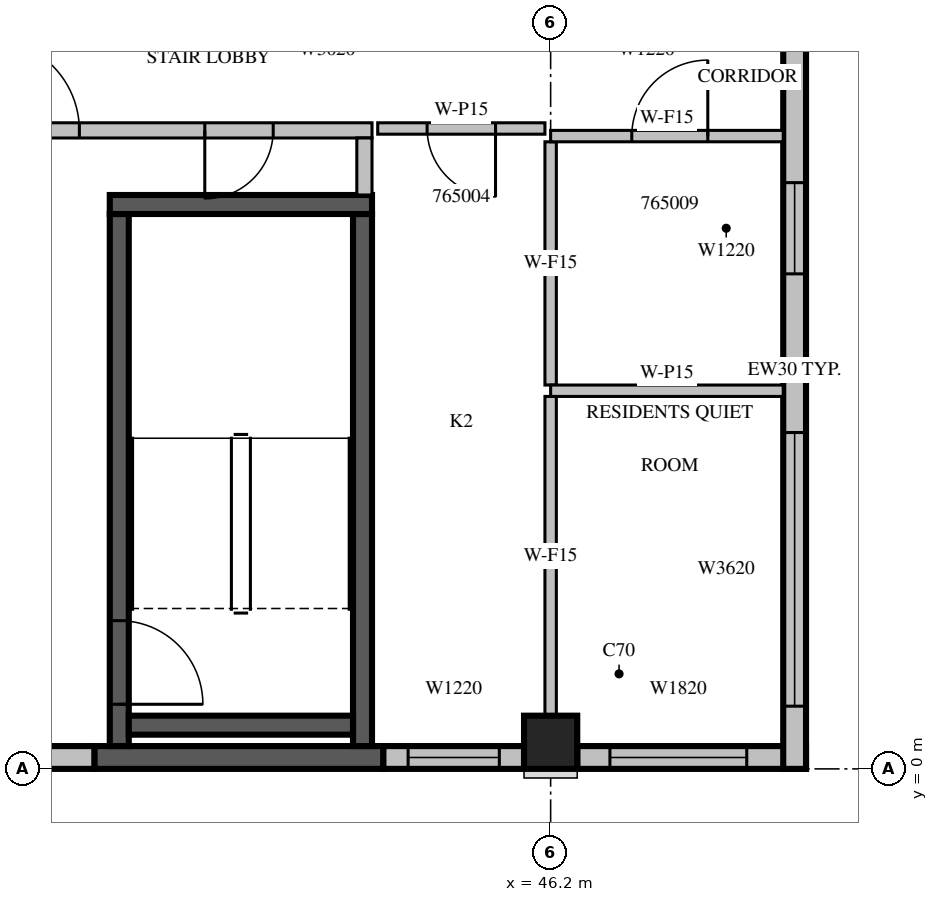
"""IFC4 building model, lengths in metres.
Left out: names, types, materials, properties, quantities, classifications, styles, units other than length and angle.
Written with IfcOpenShell. Run it as: python <this file> out.ifc"""

import sys

from ifc_helpers import new_model, si_unit, direction, frame, frame_2d, origin, origin_2d, place, context, subcontext, project, spatial, rectangle, extrude, source, transform, mapped, element, fill, save


model = new_model("IFC4")
c1 = context("Model", 3, precision=1e-05, world=origin(), true_north=direction((0.0, 1.0)))
c2 = subcontext(c1, "Body", "Model", "MODEL_VIEW")
j1 = project(units=[si_unit("LENGTHUNIT", "METRE"), si_unit("PLANEANGLEUNIT", "RADIAN")], contexts=[c1])
p1 = place(None, origin())
s1 = spatial("IfcSite", under=j1, at=p1, CompositionType="ELEMENT")
p2 = place(p1, origin())
s2 = spatial("IfcBuilding", under=s1, at=p2, CompositionType="ELEMENT")
p3 = place(p2, frame((0.0, 0.0, 288.0)))
s3 = spatial("IfcBuildingStorey", under=s2, at=p3, CompositionType="ELEMENT", Elevation=288.0)
m1 = source(origin(), c2, "Body", "SweptSolid", [
    extrude(rectangle(XDim=0.7, YDim=0.7, at=origin_2d()), origin(), (0.0, 0.0, 1.0), 3.5),
])
p4 = place(p3, frame((46.2, 0.35, 0.0), z_axis=(0.0, 0.0, 1.0), x_axis=(1.0, 0.0, 0.0)))
e1 = element("IfcColumn", 1, at=p4, inside=s3, PredefinedType="COLUMN", context=c2, shape_type="MappedRepresentation", body=[
    mapped(m1, transform((0.0, 0.0, 0.0), scale=1.0)),
])
m2 = source(origin(), c2, "Body", "SweptSolid", [
    extrude(rectangle(XDim=2.05, YDim=0.3, at=frame_2d((1.025, 0.0))), origin(), (0.0, 0.0, 1.0), 3.1),
])
p5 = place(p3, frame((38.15, 0.15, 0.0), z_axis=(0.0, 0.0, 1.0), x_axis=(1.0, 0.0, 0.0)))
e2 = element("IfcWall", 2, at=p5, inside=s3, PredefinedType="STANDARD", context=c2, shape_type="MappedRepresentation", body=[
    mapped(m2, transform((0.0, 0.0, 0.0), scale=1.0)),
])
m3 = source(origin(), c2, "Body", "SweptSolid", [
    extrude(rectangle(XDim=3.8, YDim=0.3, at=frame_2d((1.9, 0.0))), origin(), (0.0, 0.0, 1.0), 3.1),
])
p6 = place(p3, frame((40.2, 0.15, 0.0), z_axis=(0.0, 0.0, 1.0), x_axis=(1.0, 0.0, 0.0)))
e3 = element("IfcWall", 3, at=p6, inside=s3, PredefinedType="SOLIDWALL", context=c2, shape_type="MappedRepresentation", body=[
    mapped(m3, transform((0.0, 0.0, 0.0), scale=1.0)),
])
m4 = source(origin(), c2, "Body", "SweptSolid", [
    extrude(rectangle(XDim=1.85, YDim=0.3, at=frame_2d((0.925, 0.0))), origin(), (0.0, 0.0, 1.0), 3.1),
])
p7 = place(p3, frame((44.0, 0.15, 0.0), z_axis=(0.0, 0.0, 1.0), x_axis=(1.0, 0.0, 0.0)))
e4 = element("IfcWall", 4, at=p7, inside=s3, PredefinedType="STANDARD", context=c2, shape_type="MappedRepresentation", body=[
    mapped(m4, transform((0.0, 0.0, 0.0), scale=1.0)),
])
m5 = source(origin(), c2, "Body", "SweptSolid", [
    extrude(rectangle(XDim=1.2, YDim=2.0, at=frame_2d((0.6, 1.0))), frame((0.0, 0.16, 0.0), z_axis=(0.0, -1.0, 0.0), x_axis=(1.0, 0.0, 0.0)), (0.0, 0.0, 1.0), 0.32),
])
p8 = place(p7, frame((0.325, 0.0, 0.6)))
e5 = element("IfcOpeningElement", 5, at=p8, cuts=e4, PredefinedType="OPENING", context=c2, shape_type="MappedRepresentation", body=[
    mapped(m5, transform((0.0, 0.0, 0.0), scale=1.0)),
])
m6 = source(origin(), c2, "Body", "SweptSolid", [
    extrude(rectangle(XDim=3.01, YDim=0.3, at=frame_2d((1.505, 0.0))), origin(), (0.0, 0.0, 1.0), 3.1),
])
p9 = place(p3, frame((46.55, 0.15, 0.0), z_axis=(0.0, 0.0, 1.0), x_axis=(1.0, 0.0, 0.0)))
e6 = element("IfcWall", 6, at=p9, inside=s3, PredefinedType="STANDARD", context=c2, shape_type="MappedRepresentation", body=[
    mapped(m6, transform((0.0, 0.0, 0.0), scale=1.0)),
])
m7 = source(origin(), c2, "Body", "SweptSolid", [
    extrude(rectangle(XDim=1.8, YDim=2.0, at=frame_2d((0.9, 1.0))), frame((0.0, 0.16, 0.0), z_axis=(0.0, -1.0, 0.0), x_axis=(1.0, 0.0, 0.0)), (0.0, 0.0, 1.0), 0.32),
])
p10 = place(p9, frame((0.43, 0.0, 0.6)))
e7 = element("IfcOpeningElement", 7, at=p10, cuts=e6, PredefinedType="OPENING", context=c2, shape_type="MappedRepresentation", body=[
    mapped(m7, transform((0.0, 0.0, 0.0), scale=1.0)),
])
m8 = source(origin(), c2, "Body", "SweptSolid", [
    extrude(rectangle(XDim=10.5, YDim=0.3, at=frame_2d((5.25, 0.0))), origin(), (0.0, 0.0, 1.0), 3.1),
])
p11 = place(p3, frame((49.41, 0.0, 0.0), z_axis=(0.0, 0.0, 1.0), x_axis=(0.0, 1.0, 0.0)))
e8 = element("IfcWall", 8, at=p11, inside=s3, PredefinedType="STANDARD", context=c2, shape_type="MappedRepresentation", body=[
    mapped(m8, transform((0.0, 0.0, 0.0), scale=1.0)),
])
m9 = source(origin(), c2, "Body", "SweptSolid", [
    extrude(rectangle(XDim=3.6, YDim=2.0, at=frame_2d((1.8, 1.0))), frame((0.0, 0.16, 0.0), z_axis=(0.0, -1.0, 0.0), x_axis=(1.0, 0.0, 0.0)), (0.0, 0.0, 1.0), 0.32),
])
p12 = place(p11, frame((0.825, 0.0, 0.6)))
e9 = element("IfcOpeningElement", 9, at=p12, cuts=e8, PredefinedType="OPENING", context=c2, shape_type="MappedRepresentation", body=[
    mapped(m9, transform((0.0, 0.0, 0.0), scale=1.0)),
])
p13 = place(p11, frame((6.513, 0.0, 0.6)))
e10 = element("IfcOpeningElement", 10, at=p13, cuts=e8, PredefinedType="OPENING", context=c2, shape_type="MappedRepresentation", body=[
    mapped(m5, transform((0.0, 0.0, 0.0), scale=1.0)),
])
m10 = source(origin(), c2, "Body", "SweptSolid", [
    extrude(rectangle(XDim=7.0, YDim=0.25, at=frame_2d((3.5, 0.0))), origin(), (0.0, 0.0, 1.0), 3.1),
])
p14 = place(p3, frame((40.525, 0.3, 0.0), z_axis=(0.0, 0.0, 1.0), x_axis=(0.0, 1.0, 0.0)))
e11 = element("IfcWall", 11, at=p14, inside=s3, PredefinedType="SOLIDWALL", context=c2, shape_type="MappedRepresentation", body=[
    mapped(m10, transform((0.0, 0.0, 0.0), scale=1.0)),
])
m11 = source(origin(), c2, "Body", "SweptSolid", [
    extrude(rectangle(XDim=1.1, YDim=2.1, at=frame_2d((0.55, 1.05))), frame((0.0, 0.135, 0.0), z_axis=(0.0, -1.0, 0.0), x_axis=(1.0, 0.0, 0.0)), (0.0, 0.0, 1.0), 0.27),
])
p15 = place(p14, frame((0.55, 0.0, 0.0)))
e12 = element("IfcOpeningElement", 12, at=p15, cuts=e11, PredefinedType="OPENING", context=c2, shape_type="MappedRepresentation", body=[
    mapped(m11, transform((0.0, 0.0, 0.0), scale=1.0)),
])
p16 = place(p3, frame((43.725, 0.3, 0.0), z_axis=(0.0, 0.0, 1.0), x_axis=(0.0, 1.0, 0.0)))
e13 = element("IfcWall", 13, at=p16, inside=s3, PredefinedType="SOLIDWALL", context=c2, shape_type="MappedRepresentation", body=[
    mapped(m10, transform((0.0, 0.0, 0.0), scale=1.0)),
])
m12 = source(origin(), c2, "Body", "SweptSolid", [
    extrude(rectangle(XDim=3.45, YDim=0.25, at=frame_2d((1.725, 0.0))), origin(), (0.0, 0.0, 1.0), 3.1),
])
p17 = place(p3, frame((40.4, 7.425, 0.0), z_axis=(0.0, 0.0, 1.0), x_axis=(1.0, 0.0, 0.0)))
e14 = element("IfcWall", 14, at=p17, inside=s3, PredefinedType="SOLIDWALL", context=c2, shape_type="MappedRepresentation", body=[
    mapped(m12, transform((0.0, 0.0, 0.0), scale=1.0)),
])
m13 = source(origin(), c2, "Body", "SweptSolid", [
    extrude(rectangle(XDim=2.95, YDim=0.25, at=frame_2d((1.475, 0.0))), origin(), (0.0, 0.0, 1.0), 3.1),
])
p18 = place(p3, frame((40.65, 0.575, 0.0), z_axis=(0.0, 0.0, 1.0), x_axis=(1.0, 0.0, 0.0)))
e15 = element("IfcWall", 15, at=p18, inside=s3, PredefinedType="SOLIDWALL", context=c2, shape_type="MappedRepresentation", body=[
    mapped(m13, transform((0.0, 0.0, 0.0), scale=1.0)),
])
m14 = source(origin(), c2, "Body", "SweptSolid", [
    extrude(rectangle(XDim=5.45, YDim=0.2, at=frame_2d((2.725, 0.0))), origin(), (0.0, 0.0, 1.0), 3.1),
])
p19 = place(p3, frame((38.4, 8.4, 0.0), z_axis=(0.0, 0.0, 1.0), x_axis=(1.0, 0.0, 0.0)))
e16 = element("IfcWall", 16, at=p19, inside=s3, PredefinedType="PARTITIONING", context=c2, shape_type="MappedRepresentation", body=[
    mapped(m14, transform((0.0, 0.0, 0.0), scale=1.0)),
])
m15 = source(origin(), c2, "Body", "SweptSolid", [
    extrude(rectangle(XDim=1.2, YDim=2.1, at=frame_2d((0.6, 1.05))), frame((0.0, 0.11, 0.0), z_axis=(0.0, -1.0, 0.0), x_axis=(1.0, 0.0, 0.0)), (0.0, 0.0, 1.0), 0.22),
])
p20 = place(p19, frame((0.4, 0.0, 0.0)))
e17 = element("IfcOpeningElement", 17, at=p20, cuts=e16, PredefinedType="OPENING", context=c2, shape_type="MappedRepresentation", body=[
    mapped(m15, transform((0.0, 0.0, 0.0), scale=1.0)),
])
m16 = source(origin(), c2, "Body", "SweptSolid", [
    extrude(rectangle(XDim=0.9, YDim=2.1, at=frame_2d((0.45, 1.05))), frame((0.0, 0.11, 0.0), z_axis=(0.0, -1.0, 0.0), x_axis=(1.0, 0.0, 0.0)), (0.0, 0.0, 1.0), 0.22),
])
p21 = place(p19, frame((3.25, 0.0, 0.0)))
e18 = element("IfcOpeningElement", 18, at=p21, cuts=e16, PredefinedType="OPENING", context=c2, shape_type="MappedRepresentation", body=[
    mapped(m16, transform((0.0, 0.0, 0.0), scale=1.0)),
])
m17 = source(origin(), c2, "Body", "SweptSolid", [
    extrude(rectangle(XDim=0.75, YDim=0.2, at=frame_2d((0.375, 0.0))), origin(), (0.0, 0.0, 1.0), 3.1),
])
p22 = place(p3, frame((43.75, 7.55, 0.0), z_axis=(0.0, 0.0, 1.0), x_axis=(0.0, 1.0, 0.0)))
e19 = element("IfcWall", 19, at=p22, inside=s3, PredefinedType="PARTITIONING", context=c2, shape_type="MappedRepresentation", body=[
    mapped(m17, transform((0.0, 0.0, 0.0), scale=1.0)),
])
m18 = source(origin(), c2, "Body", "SweptSolid", [
    extrude(rectangle(XDim=2.2, YDim=0.15, at=frame_2d((1.1, 0.0))), origin(), (0.0, 0.0, 1.0), 3.1),
])
p23 = place(p3, frame((46.125, 8.425, 0.0), z_axis=(0.0, 0.0, 1.0), x_axis=(-1.0, 0.0, 0.0)))
e20 = element("IfcWall", 20, at=p23, inside=s3, PredefinedType="PARTITIONING", context=c2, shape_type="MappedRepresentation", body=[
    mapped(m18, transform((0.0, 0.0, 0.0), scale=1.0)),
])
m19 = source(origin(), c2, "Body", "SweptSolid", [
    extrude(rectangle(XDim=0.9, YDim=2.1, at=frame_2d((0.45, 1.05))), frame((0.0, 0.085, 0.0), z_axis=(0.0, -1.0, 0.0), x_axis=(1.0, 0.0, 0.0)), (0.0, 0.0, 1.0), 0.17),
])
p24 = place(p23, frame((0.65, 0.0, 0.0)))
e21 = element("IfcOpeningElement", 21, at=p24, cuts=e20, PredefinedType="OPENING", context=c2, shape_type="MappedRepresentation", body=[
    mapped(m19, transform((0.0, 0.0, 0.0), scale=1.0)),
])
m20 = source(origin(), c2, "Body", "SweptSolid", [
    extrude(rectangle(XDim=4.201, YDim=0.15, at=frame_2d((2.1, 0.0))), origin(), (0.0, 0.0, 1.0), 3.1),
])
p25 = place(p3, frame((46.2, 0.699, 0.0), z_axis=(0.0, 0.0, 1.0), x_axis=(0.0, 1.0, 0.0)))
e22 = element("IfcWall", 22, at=p25, inside=s3, PredefinedType="PARTITIONING", context=c2, shape_type="MappedRepresentation", body=[
    mapped(m20, transform((0.0, 0.0, 0.0), scale=1.0)),
])
m21 = source(origin(), c2, "Body", "SweptSolid", [
    extrude(rectangle(XDim=3.2, YDim=0.15, at=frame_2d((1.6, 0.0))), origin(), (0.0, 0.0, 1.0), 3.1),
])
p26 = place(p3, frame((46.2, 5.05, 0.0), z_axis=(0.0, 0.0, 1.0), x_axis=(0.0, 1.0, 0.0)))
e23 = element("IfcWall", 23, at=p26, inside=s3, PredefinedType="PARTITIONING", context=c2, shape_type="MappedRepresentation", body=[
    mapped(m21, transform((0.0, 0.0, 0.0), scale=1.0)),
])
m22 = source(origin(), c2, "Body", "SweptSolid", [
    extrude(rectangle(XDim=3.06, YDim=0.15, at=frame_2d((1.53, 0.0))), origin(), (0.0, 0.0, 1.0), 3.1),
])
p27 = place(p3, frame((49.26, 4.975, 0.0), z_axis=(0.0, 0.0, 1.0), x_axis=(-1.0, 0.0, 0.0)))
e24 = element("IfcWall", 24, at=p27, inside=s3, PredefinedType="PARTITIONING", context=c2, shape_type="MappedRepresentation", body=[
    mapped(m22, transform((0.0, 0.0, 0.0), scale=1.0)),
])
p28 = place(p3, frame((49.26, 8.325, 0.0), z_axis=(0.0, 0.0, 1.0), x_axis=(-1.0, 0.0, 0.0)))
e25 = element("IfcWall", 25, at=p28, inside=s3, PredefinedType="PARTITIONING", context=c2, shape_type="MappedRepresentation", body=[
    mapped(m22, transform((0.0, 0.0, 0.0), scale=1.0)),
])
m23 = source(origin(), c2, "Body", "SweptSolid", [
    extrude(rectangle(XDim=1.0, YDim=2.1, at=frame_2d((0.5, 1.05))), frame((0.0, 0.085, 0.0), z_axis=(0.0, -1.0, 0.0), x_axis=(1.0, 0.0, 0.0)), (0.0, 0.0, 1.0), 0.17),
])
p29 = place(p28, frame((0.993, 0.0, 0.0)))
e26 = element("IfcOpeningElement", 26, at=p29, cuts=e25, PredefinedType="OPENING", context=c2, shape_type="MappedRepresentation", body=[
    mapped(m23, transform((0.0, 0.0, 0.0), scale=1.0)),
])
m24 = source(origin(), c2, "Body", "SweptSolid", [
    extrude(rectangle(XDim=1.2, YDim=2.0, at=frame_2d((0.6, 1.0))), frame((0.0, 0.03, 0.0), z_axis=(0.0, -1.0, 0.0), x_axis=(1.0, 0.0, 0.0)), (0.0, 0.0, 1.0), 0.06),
])
p30 = place(p8, origin())
e27 = element("IfcWindow", 27, at=p30, inside=s3, PartitioningType="SINGLE_PANEL", PredefinedType="WINDOW", context=c2, shape_type="MappedRepresentation", body=[
    mapped(m24, transform((0.0, 0.0, 0.0), scale=1.0)),
])
fill(e5, e27)
m25 = source(origin(), c2, "Body", "SweptSolid", [
    extrude(rectangle(XDim=1.8, YDim=2.0, at=frame_2d((0.9, 1.0))), frame((0.0, 0.03, 0.0), z_axis=(0.0, -1.0, 0.0), x_axis=(1.0, 0.0, 0.0)), (0.0, 0.0, 1.0), 0.06),
])
p31 = place(p10, origin())
e28 = element("IfcWindow", 28, at=p31, inside=s3, PartitioningType="SINGLE_PANEL", PredefinedType="WINDOW", context=c2, shape_type="MappedRepresentation", body=[
    mapped(m25, transform((0.0, 0.0, 0.0), scale=1.0)),
])
fill(e7, e28)
m26 = source(origin(), c2, "Body", "SweptSolid", [
    extrude(rectangle(XDim=3.6, YDim=2.0, at=frame_2d((1.8, 1.0))), frame((0.0, 0.03, 0.0), z_axis=(0.0, -1.0, 0.0), x_axis=(1.0, 0.0, 0.0)), (0.0, 0.0, 1.0), 0.06),
])
p32 = place(p12, origin())
e29 = element("IfcWindow", 29, at=p32, inside=s3, PartitioningType="SINGLE_PANEL", PredefinedType="WINDOW", context=c2, shape_type="MappedRepresentation", body=[
    mapped(m26, transform((0.0, 0.0, 0.0), scale=1.0)),
])
fill(e9, e29)
p33 = place(p13, origin())
e30 = element("IfcWindow", 30, at=p33, inside=s3, PartitioningType="SINGLE_PANEL", PredefinedType="WINDOW", context=c2, shape_type="MappedRepresentation", body=[
    mapped(m24, transform((0.0, 0.0, 0.0), scale=1.0)),
])
fill(e10, e30)
m27 = source(origin(), c2, "Body", "SweptSolid", [
    extrude(rectangle(XDim=1.1, YDim=2.1, at=frame_2d((0.55, 1.05))), frame((0.0, 0.025, 0.0), z_axis=(0.0, -1.0, 0.0), x_axis=(1.0, 0.0, 0.0)), (0.0, 0.0, 1.0), 0.05),
])
p34 = place(p15, origin())
e31 = element("IfcDoor", 31, at=p34, inside=s3, OperationType="SINGLE_SWING_RIGHT", PredefinedType="DOOR", context=c2, shape_type="MappedRepresentation", body=[
    mapped(m27, transform((0.0, 0.0, 0.0), scale=1.0)),
])
fill(e12, e31)
m28 = source(origin(), c2, "Body", "SweptSolid", [
    extrude(rectangle(XDim=1.2, YDim=2.1, at=frame_2d((0.6, 1.05))), frame((0.0, 0.025, 0.0), z_axis=(0.0, -1.0, 0.0), x_axis=(1.0, 0.0, 0.0)), (0.0, 0.0, 1.0), 0.05),
])
p35 = place(p20, origin())
e32 = element("IfcDoor", 32, at=p35, inside=s3, OperationType="SINGLE_SWING_LEFT", PredefinedType="DOOR", context=c2, shape_type="MappedRepresentation", body=[
    mapped(m28, transform((0.0, 0.0, 0.0), scale=1.0)),
])
fill(e17, e32)
m29 = source(origin(), c2, "Body", "SweptSolid", [
    extrude(rectangle(XDim=0.9, YDim=2.1, at=frame_2d((0.45, 1.05))), frame((0.0, 0.025, 0.0), z_axis=(0.0, -1.0, 0.0), x_axis=(1.0, 0.0, 0.0)), (0.0, 0.0, 1.0), 0.05),
])
p36 = place(p21, origin())
e33 = element("IfcDoor", 33, at=p36, inside=s3, OperationType="SINGLE_SWING_RIGHT", PredefinedType="DOOR", context=c2, shape_type="MappedRepresentation", body=[
    mapped(m29, transform((0.0, 0.0, 0.0), scale=1.0)),
])
fill(e18, e33)
p37 = place(p24, origin())
e34 = element("IfcDoor", 34, at=p37, inside=s3, OperationType="SINGLE_SWING_LEFT", PredefinedType="DOOR", context=c2, shape_type="MappedRepresentation", body=[
    mapped(m29, transform((0.0, 0.0, 0.0), scale=1.0)),
])
fill(e21, e34)
m30 = source(origin(), c2, "Body", "SweptSolid", [
    extrude(rectangle(XDim=1.0, YDim=2.1, at=frame_2d((0.5, 1.05))), frame((0.0, 0.025, 0.0), z_axis=(0.0, -1.0, 0.0), x_axis=(1.0, 0.0, 0.0)), (0.0, 0.0, 1.0), 0.05),
])
p38 = place(p29, origin())
e35 = element("IfcDoor", 35, at=p38, inside=s3, OperationType="SINGLE_SWING_RIGHT", PredefinedType="DOOR", context=c2, shape_type="MappedRepresentation", body=[
    mapped(m30, transform((0.0, 0.0, 0.0), scale=1.0)),
])
fill(e26, e35)
save(model, sys.argv[1])
